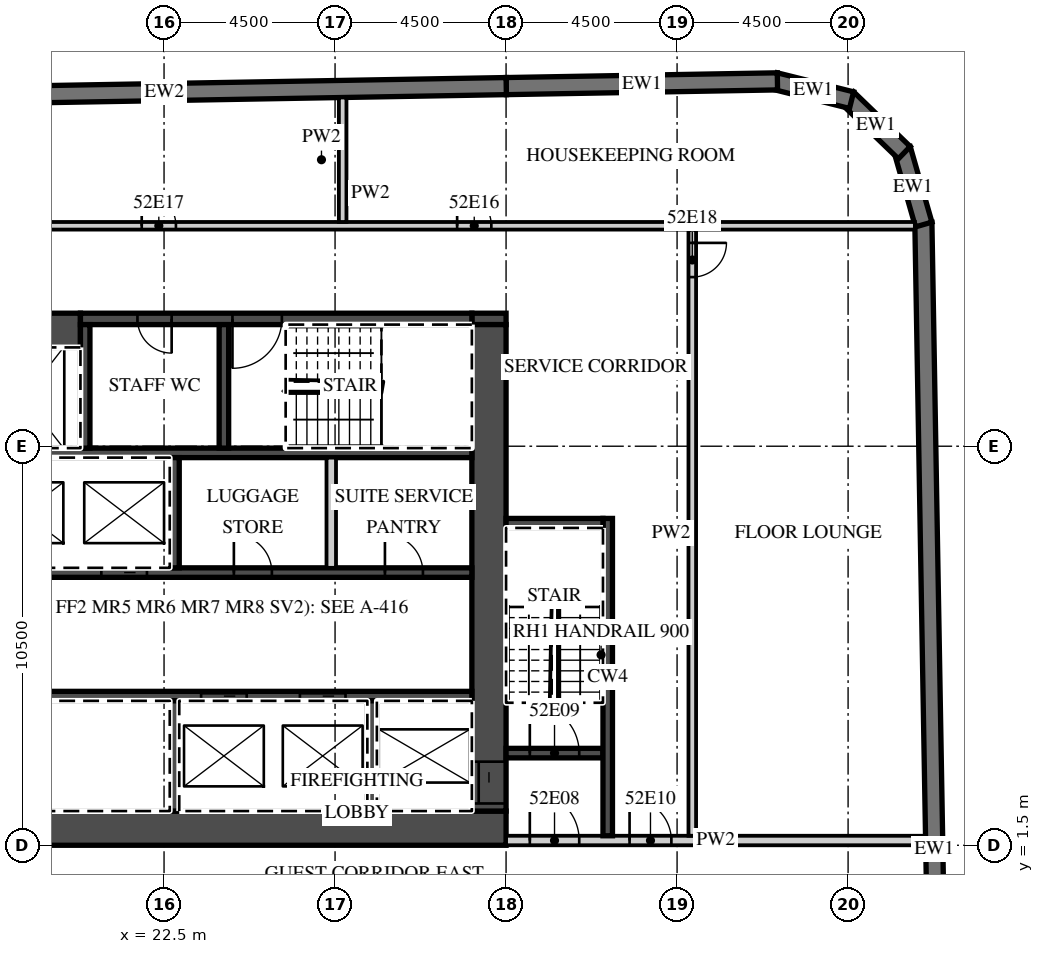
"""IFC4 building model, lengths in metres.
Left out: names, types, materials, properties, quantities, classifications, styles, units other than length and angle.
Written with IfcOpenShell. Run it as: python <this file> out.ifc"""

import sys

from ifc_helpers import new_model, si_unit, direction, frame, frame_2d, origin, place, context, subcontext, project, spatial, polyline, rectangle, outline, extrude, element, fill, save


model = new_model("IFC4")
c1 = context("Model", 3, precision=1e-05, world=origin(), true_north=direction((0.0, 1.0)))
c2 = subcontext(c1, "Body", "Model", "MODEL_VIEW")
j1 = project(units=[si_unit("LENGTHUNIT", "METRE"), si_unit("PLANEANGLEUNIT", "RADIAN")], contexts=[c1])
p1 = place(None, origin())
s1 = spatial("IfcSite", under=j1, at=p1, CompositionType="ELEMENT")
p2 = place(p1, origin())
s2 = spatial("IfcBuilding", under=s1, at=p2, CompositionType="ELEMENT")
p3 = place(p2, frame((0.0, 0.0, 217.7)))
s3 = spatial("IfcBuildingStorey", under=s2, at=p3, CompositionType="ELEMENT", Elevation=217.7)
p4 = place(p3, frame((43.057, -15.103, 0.0), z_axis=(0.0, 0.0, 1.0), x_axis=(-0.017452408953, 0.999847695112, 0.0)))
e1 = element("IfcWall", 1, at=p4, inside=s3, PredefinedType="SOLIDWALL", context=c2, shape_type="SweptSolid", body=[
    extrude(rectangle(XDim=33.0, YDim=0.45, at=frame_2d((16.5, 0.0))), origin(), (0.0, 0.0, 1.0), 3.02),
])
p5 = place(p3, frame((42.49, 17.833, 0.0), z_axis=(0.0, 0.0, 1.0), x_axis=(-0.275546368831, 0.961287781377, 0.0)))
e2 = element("IfcWall", 2, at=p5, inside=s3, PredefinedType="SOLIDWALL", context=c2, shape_type="SweptSolid", body=[
    extrude(outline(polyline([(0.0, -0.225), (2.071, -0.225), (1.95, 0.225), (0.121, 0.225), (0.0, -0.225)])), origin(), (0.0, 0.0, 1.0), 3.02),
])
p6 = place(p3, frame((41.979, 19.724, 0.0), z_axis=(0.0, 0.0, 1.0), x_axis=(-0.719379111448, 0.694617660308, 0.0)))
e3 = element("IfcWall", 3, at=p6, inside=s3, PredefinedType="SOLIDWALL", context=c2, shape_type="SweptSolid", body=[
    extrude(outline(polyline([(0.0, -0.225), (2.071, -0.225), (1.95, 0.225), (0.121, 0.225), (0.0, -0.225)])), origin(), (0.0, 0.0, 1.0), 3.02),
])
p7 = place(p3, frame((40.591, 21.106, 0.0), z_axis=(0.0, 0.0, 1.0), x_axis=(-0.970287979719, 0.241952963225, 0.0)))
e4 = element("IfcWall", 4, at=p7, inside=s3, PredefinedType="SOLIDWALL", context=c2, shape_type="SweptSolid", body=[
    extrude(outline(polyline([(0.0, -0.225), (2.071, -0.225), (1.95, 0.225), (0.121, 0.225), (0.0, -0.225)])), origin(), (0.0, 0.0, 1.0), 3.02),
])
p8 = place(p3, frame((38.641, 21.6, 0.0), z_axis=(0.0, 0.0, 1.0), x_axis=(-0.999847245074, -0.017478172627, 0.0)))
e5 = element("IfcWall", 5, at=p8, inside=s3, PredefinedType="SOLIDWALL", context=c2, shape_type="SweptSolid", body=[
    extrude(rectangle(XDim=7.138, YDim=0.45, at=frame_2d((3.569, 0.0))), origin(), (0.0, 0.0, 1.0), 3.02),
])
p9 = place(p3, frame((31.504, 21.476, 0.0), z_axis=(0.0, 0.0, 1.0), x_axis=(-0.999847677887, -0.017453395744, 0.0)))
e6 = element("IfcWall", 6, at=p9, inside=s3, PredefinedType="SOLIDWALL", context=c2, shape_type="SweptSolid", body=[
    extrude(rectangle(XDim=18.003, YDim=0.45, at=frame_2d((9.001, 0.0))), origin(), (0.0, 0.0, 1.0), 3.02),
])
p10 = place(p3, frame((13.5, 1.95, 0.0), z_axis=(0.0, 0.0, 1.0), x_axis=(1.0, 0.0, 0.0)))
e7 = element("IfcWall", 7, at=p10, inside=s3, PredefinedType="SHEAR", context=c2, shape_type="SweptSolid", body=[
    extrude(rectangle(XDim=18.0, YDim=0.9, at=frame_2d((9.0, 0.0))), origin(), (0.0, 0.0, 1.0), 3.02),
])
p11 = place(p10, frame((1.475, 0.0, 0.0)))
e8 = element("IfcOpeningElement", 8, at=p11, cuts=e7, PredefinedType="OPENING", context=c2, shape_type="SweptSolid", body=[
    extrude(rectangle(XDim=1.8, YDim=2.1, at=frame_2d((0.9, 1.05))), frame((0.0, 0.46, 0.0), z_axis=(0.0, -1.0, 0.0), x_axis=(1.0, 0.0, 0.0)), (0.0, 0.0, 1.0), 0.92),
])
p12 = place(p3, frame((13.5, 15.05, 0.0), z_axis=(0.0, 0.0, 1.0), x_axis=(1.0, 0.0, 0.0)))
e9 = element("IfcWall", 9, at=p12, inside=s3, PredefinedType="SHEAR", context=c2, shape_type="SweptSolid", body=[
    extrude(rectangle(XDim=6.8, YDim=0.9, at=frame_2d((3.4, 0.0))), origin(), (0.0, 0.0, 1.0), 3.02),
])
p13 = place(p12, frame((4.725, 0.0, 0.0)))
e10 = element("IfcOpeningElement", 10, at=p13, cuts=e9, PredefinedType="OPENING", context=c2, shape_type="SweptSolid", body=[
    extrude(rectangle(XDim=1.2, YDim=2.1, at=frame_2d((0.6, 1.05))), frame((0.0, 0.46, 0.0), z_axis=(0.0, -1.0, 0.0), x_axis=(1.0, 0.0, 0.0)), (0.0, 0.0, 1.0), 0.92),
])
p14 = place(p3, frame((30.6, 15.35, 0.0), z_axis=(0.0, 0.0, 1.0), x_axis=(1.0, 0.0, 0.0)))
e11 = element("IfcWall", 11, at=p14, inside=s3, PredefinedType="SHEAR", context=c2, shape_type="SweptSolid", body=[
    extrude(rectangle(XDim=0.9, YDim=0.3, at=frame_2d((0.45, 0.0))), origin(), (0.0, 0.0, 1.0), 3.02),
])
p15 = place(p3, frame((20.3, 15.35, 0.0), z_axis=(0.0, 0.0, 1.0), x_axis=(1.0, 0.0, 0.0)))
e12 = element("IfcWall", 12, at=p15, inside=s3, PredefinedType="SHEAR", context=c2, shape_type="SweptSolid", body=[
    extrude(rectangle(XDim=10.3, YDim=0.3, at=frame_2d((5.15, 0.0))), origin(), (0.0, 0.0, 1.0), 3.02),
])
p16 = place(p15, frame((4.0, 0.0, 0.0)))
e13 = element("IfcOpeningElement", 13, at=p16, cuts=e12, PredefinedType="OPENING", context=c2, shape_type="SweptSolid", body=[
    extrude(rectangle(XDim=1.3, YDim=2.1, at=frame_2d((0.65, 1.05))), frame((0.0, 0.16, 0.0), z_axis=(0.0, -1.0, 0.0), x_axis=(1.0, 0.0, 0.0)), (0.0, 0.0, 1.0), 0.32),
])
p17 = place(p15, frame((1.5, 0.0, 0.0)))
e14 = element("IfcOpeningElement", 14, at=p17, cuts=e12, PredefinedType="OPENING", context=c2, shape_type="SweptSolid", body=[
    extrude(rectangle(XDim=0.9, YDim=2.1, at=frame_2d((0.45, 1.05))), frame((0.0, 0.16, 0.0), z_axis=(0.0, -1.0, 0.0), x_axis=(1.0, 0.0, 0.0)), (0.0, 0.0, 1.0), 0.32),
])
p18 = place(p3, frame((31.05, 2.4, 0.0), z_axis=(0.0, 0.0, 1.0), x_axis=(0.0, 1.0, 0.0)))
e15 = element("IfcWall", 15, at=p18, inside=s3, PredefinedType="SHEAR", context=c2, shape_type="SweptSolid", body=[
    extrude(rectangle(XDim=12.8, YDim=0.9, at=frame_2d((6.4, 0.0))), origin(), (0.0, 0.0, 1.0), 3.02),
])
p19 = place(p18, frame((0.2, 0.0, 0.0)))
e16 = element("IfcOpeningElement", 16, at=p19, cuts=e15, PredefinedType="OPENING", context=c2, shape_type="SweptSolid", body=[
    extrude(rectangle(XDim=1.1, YDim=2.1, at=frame_2d((0.55, 1.05))), frame((0.0, 0.46, 0.0), z_axis=(0.0, -1.0, 0.0), x_axis=(1.0, 0.0, 0.0)), (0.0, 0.0, 1.0), 0.92),
])
p20 = place(p3, frame((17.6, 5.425, 0.0), z_axis=(0.0, 0.0, 1.0), x_axis=(1.0, 0.0, 0.0)))
e17 = element("IfcWall", 17, at=p20, inside=s3, PredefinedType="SHEAR", context=c2, shape_type="SweptSolid", body=[
    extrude(rectangle(XDim=13.0, YDim=0.25, at=frame_2d((6.5, 0.0))), origin(), (0.0, 0.0, 1.0), 3.02),
])
p21 = place(p20, frame((8.475, 0.0, 0.0)))
e18 = element("IfcOpeningElement", 18, at=p21, cuts=e17, PredefinedType="OPENING", context=c2, shape_type="SweptSolid", body=[
    extrude(rectangle(XDim=1.2, YDim=2.1, at=frame_2d((0.6, 1.05))), frame((0.0, 0.135, 0.0), z_axis=(0.0, -1.0, 0.0), x_axis=(1.0, 0.0, 0.0)), (0.0, 0.0, 1.0), 0.27),
])
p22 = place(p20, frame((5.875, 0.0, 0.0)))
e19 = element("IfcOpeningElement", 19, at=p22, cuts=e17, PredefinedType="OPENING", context=c2, shape_type="SweptSolid", body=[
    extrude(rectangle(XDim=1.2, YDim=2.1, at=frame_2d((0.6, 1.05))), frame((0.0, 0.135, 0.0), z_axis=(0.0, -1.0, 0.0), x_axis=(1.0, 0.0, 0.0)), (0.0, 0.0, 1.0), 0.27),
])
for number, where, z_axis, x_axis in (
    (20, (27.975, 2.4, 0.0), (0.0, 0.0, 1.0), (0.0, 1.0, 0.0)),
    (21, (22.775, 2.4, 0.0), (0.0, 0.0, 1.0), (0.0, 1.0, 0.0)),
):
    element("IfcWall", number, at=place(p3, frame(where, z_axis=z_axis, x_axis=x_axis)), inside=s3, PredefinedType="SHEAR", context=c2, shape_type="SweptSolid", body=[
        extrude(rectangle(XDim=2.9, YDim=0.25, at=frame_2d((1.45, 0.0))), origin(), (0.0, 0.0, 1.0), 3.02),
    ])
p23 = place(p3, frame((14.4, 8.675, 0.0), z_axis=(0.0, 0.0, 1.0), x_axis=(1.0, 0.0, 0.0)))
e22 = element("IfcWall", 22, at=p23, inside=s3, PredefinedType="SHEAR", context=c2, shape_type="SweptSolid", body=[
    extrude(rectangle(XDim=16.2, YDim=0.25, at=frame_2d((8.1, 0.0))), origin(), (0.0, 0.0, 1.0), 3.02),
])
p24 = place(p23, frame((6.45, 0.0, 0.0)))
e23 = element("IfcOpeningElement", 23, at=p24, cuts=e22, PredefinedType="OPENING", context=c2, shape_type="SweptSolid", body=[
    extrude(rectangle(XDim=1.2, YDim=2.1, at=frame_2d((0.6, 1.05))), frame((0.0, 0.135, 0.0), z_axis=(0.0, -1.0, 0.0), x_axis=(1.0, 0.0, 0.0)), (0.0, 0.0, 1.0), 0.27),
])
p25 = place(p23, frame((3.8, 0.0, 0.0)))
e24 = element("IfcOpeningElement", 24, at=p25, cuts=e22, PredefinedType="OPENING", context=c2, shape_type="SweptSolid", body=[
    extrude(rectangle(XDim=1.2, YDim=2.1, at=frame_2d((0.6, 1.05))), frame((0.0, 0.135, 0.0), z_axis=(0.0, -1.0, 0.0), x_axis=(1.0, 0.0, 0.0)), (0.0, 0.0, 1.0), 0.27),
])
p26 = place(p23, frame((0.65, 0.0, 0.0)))
e25 = element("IfcOpeningElement", 25, at=p26, cuts=e22, PredefinedType="OPENING", context=c2, shape_type="SweptSolid", body=[
    extrude(rectangle(XDim=1.3, YDim=2.1, at=frame_2d((0.65, 1.05))), frame((0.0, 0.135, 0.0), z_axis=(0.0, -1.0, 0.0), x_axis=(1.0, 0.0, 0.0)), (0.0, 0.0, 1.0), 0.27),
])
p27 = place(p23, frame((13.913, 0.0, 0.0)))
e26 = element("IfcOpeningElement", 26, at=p27, cuts=e22, PredefinedType="OPENING", context=c2, shape_type="SweptSolid", body=[
    extrude(rectangle(XDim=1.0, YDim=2.1, at=frame_2d((0.5, 1.05))), frame((0.0, 0.135, 0.0), z_axis=(0.0, -1.0, 0.0), x_axis=(1.0, 0.0, 0.0)), (0.0, 0.0, 1.0), 0.27),
])
p28 = place(p23, frame((9.938, 0.0, 0.0)))
e27 = element("IfcOpeningElement", 27, at=p28, cuts=e22, PredefinedType="OPENING", context=c2, shape_type="SweptSolid", body=[
    extrude(rectangle(XDim=1.0, YDim=2.1, at=frame_2d((0.5, 1.05))), frame((0.0, 0.135, 0.0), z_axis=(0.0, -1.0, 0.0), x_axis=(1.0, 0.0, 0.0)), (0.0, 0.0, 1.0), 0.27),
])
p29 = place(p3, frame((17.35, 11.825, 0.0), z_axis=(0.0, 0.0, 1.0), x_axis=(1.0, 0.0, 0.0)))
e28 = element("IfcWall", 28, at=p29, inside=s3, PredefinedType="SHEAR", context=c2, shape_type="SweptSolid", body=[
    extrude(rectangle(XDim=13.25, YDim=0.25, at=frame_2d((6.625, 0.0))), origin(), (0.0, 0.0, 1.0), 3.02),
])
p30 = place(p3, frame((22.775, 8.8, 0.0), z_axis=(0.0, 0.0, 1.0), x_axis=(0.0, 1.0, 0.0)))
e29 = element("IfcWall", 29, at=p30, inside=s3, PredefinedType="SHEAR", context=c2, shape_type="SweptSolid", body=[
    extrude(rectangle(XDim=2.9, YDim=0.25, at=frame_2d((1.45, 0.0))), origin(), (0.0, 0.0, 1.0), 3.02),
])
p31 = place(p3, frame((26.9, 8.8, 0.0), z_axis=(0.0, 0.0, 1.0), x_axis=(0.0, 1.0, 0.0)))
e30 = element("IfcWall", 30, at=p31, inside=s3, PredefinedType="PARTITIONING", context=c2, shape_type="SweptSolid", body=[
    extrude(rectangle(XDim=2.9, YDim=0.25, at=frame_2d((1.45, 0.0))), origin(), (0.0, 0.0, 1.0), 3.02),
])
for number, where, z_axis, x_axis in (
    (31, (20.425, 11.95, 0.0), (0.0, 0.0, 1.0), (0.0, 1.0, 0.0)),
    (32, (24.075, 11.95, 0.0), (0.0, 0.0, 1.0), (0.0, 1.0, 0.0)),
):
    element("IfcWall", number, at=place(p3, frame(where, z_axis=z_axis, x_axis=x_axis)), inside=s3, PredefinedType="SHEAR", context=c2, shape_type="SweptSolid", body=[
        extrude(rectangle(XDim=3.25, YDim=0.25, at=frame_2d((1.625, 0.0))), origin(), (0.0, 0.0, 1.0), 3.02),
    ])
p32 = place(p3, frame((31.5, 1.625, 0.0), z_axis=(0.0, 0.0, 1.0), x_axis=(1.0, 0.0, 0.0)))
e33 = element("IfcWall", 33, at=p32, inside=s3, PredefinedType="PARTITIONING", context=c2, shape_type="SweptSolid", body=[
    extrude(rectangle(XDim=11.04, YDim=0.25, at=frame_2d((5.52, 0.0))), origin(), (0.0, 0.0, 1.0), 3.02),
])
p33 = place(p32, frame((0.625, 0.0, 0.0)))
e34 = element("IfcOpeningElement", 34, at=p33, cuts=e33, PredefinedType="OPENING", context=c2, shape_type="SweptSolid", body=[
    extrude(rectangle(XDim=1.3, YDim=2.1, at=frame_2d((0.65, 1.05))), frame((0.0, 0.135, 0.0), z_axis=(0.0, -1.0, 0.0), x_axis=(1.0, 0.0, 0.0)), (0.0, 0.0, 1.0), 0.27),
])
p34 = place(p32, frame((3.25, 0.0, 0.0)))
e35 = element("IfcOpeningElement", 35, at=p34, cuts=e33, PredefinedType="OPENING", context=c2, shape_type="SweptSolid", body=[
    extrude(rectangle(XDim=1.1, YDim=2.1, at=frame_2d((0.55, 1.05))), frame((0.0, 0.135, 0.0), z_axis=(0.0, -1.0, 0.0), x_axis=(1.0, 0.0, 0.0)), (0.0, 0.0, 1.0), 0.27),
])
p35 = place(p3, frame((31.5, 3.925, 0.0), z_axis=(0.0, 0.0, 1.0), x_axis=(1.0, 0.0, 0.0)))
e36 = element("IfcWall", 36, at=p35, inside=s3, PredefinedType="SHEAR", context=c2, shape_type="SweptSolid", body=[
    extrude(rectangle(XDim=2.55, YDim=0.25, at=frame_2d((1.275, 0.0))), origin(), (0.0, 0.0, 1.0), 3.02),
])
p36 = place(p35, frame((0.625, 0.0, 0.0)))
e37 = element("IfcOpeningElement", 37, at=p36, cuts=e36, PredefinedType="OPENING", context=c2, shape_type="SweptSolid", body=[
    extrude(rectangle(XDim=1.3, YDim=2.1, at=frame_2d((0.65, 1.05))), frame((0.0, 0.135, 0.0), z_axis=(0.0, -1.0, 0.0), x_axis=(1.0, 0.0, 0.0)), (0.0, 0.0, 1.0), 0.27),
])
p37 = place(p3, frame((34.175, 1.75, 0.0), z_axis=(0.0, 0.0, 1.0), x_axis=(0.0, 1.0, 0.0)))
e38 = element("IfcWall", 38, at=p37, inside=s3, PredefinedType="SHEAR", context=c2, shape_type="SweptSolid", body=[
    extrude(rectangle(XDim=8.35, YDim=0.25, at=frame_2d((4.175, 0.0))), origin(), (0.0, 0.0, 1.0), 3.02),
])
p38 = place(p3, frame((31.5, 9.975, 0.0), z_axis=(0.0, 0.0, 1.0), x_axis=(1.0, 0.0, 0.0)))
e39 = element("IfcWall", 39, at=p38, inside=s3, PredefinedType="SHEAR", context=c2, shape_type="SweptSolid", body=[
    extrude(rectangle(XDim=2.55, YDim=0.25, at=frame_2d((1.275, 0.0))), origin(), (0.0, 0.0, 1.0), 3.02),
])
p39 = place(p3, frame((36.4, 1.75, 0.0), z_axis=(0.0, 0.0, 1.0), x_axis=(0.0, 1.0, 0.0)))
e40 = element("IfcWall", 40, at=p39, inside=s3, PredefinedType="PARTITIONING", context=c2, shape_type="SweptSolid", body=[
    extrude(rectangle(XDim=15.95, YDim=0.2, at=frame_2d((7.975, 0.0))), origin(), (0.0, 0.0, 1.0), 3.02),
])
p40 = place(p39, frame((14.7, 0.0, 0.0)))
e41 = element("IfcOpeningElement", 41, at=p40, cuts=e40, PredefinedType="OPENING", context=c2, shape_type="SweptSolid", body=[
    extrude(rectangle(XDim=0.9, YDim=2.1, at=frame_2d((0.45, 1.05))), frame((0.0, 0.11, 0.0), z_axis=(0.0, -1.0, 0.0), x_axis=(1.0, 0.0, 0.0)), (0.0, 0.0, 1.0), 0.22),
])
p41 = place(p3, frame((13.6, 17.8, 0.0), z_axis=(0.0, 0.0, 1.0), x_axis=(1.0, 0.0, 0.0)))
e42 = element("IfcWall", 42, at=p41, inside=s3, PredefinedType="PARTITIONING", context=c2, shape_type="SweptSolid", body=[
    extrude(rectangle(XDim=28.657, YDim=0.2, at=frame_2d((14.329, 0.0))), origin(), (0.0, 0.0, 1.0), 3.02),
])
p42 = place(p41, frame((16.613, 0.0, 0.0)))
e43 = element("IfcOpeningElement", 43, at=p42, cuts=e42, PredefinedType="OPENING", context=c2, shape_type="SweptSolid", body=[
    extrude(rectangle(XDim=0.9, YDim=2.1, at=frame_2d((0.45, 1.05))), frame((0.0, 0.11, 0.0), z_axis=(0.0, -1.0, 0.0), x_axis=(1.0, 0.0, 0.0)), (0.0, 0.0, 1.0), 0.22),
])
p43 = place(p41, frame((8.312, 0.0, 0.0)))
e44 = element("IfcOpeningElement", 44, at=p43, cuts=e42, PredefinedType="OPENING", context=c2, shape_type="SweptSolid", body=[
    extrude(rectangle(XDim=0.9, YDim=2.1, at=frame_2d((0.45, 1.05))), frame((0.0, 0.11, 0.0), z_axis=(0.0, -1.0, 0.0), x_axis=(1.0, 0.0, 0.0)), (0.0, 0.0, 1.0), 0.22),
])
p44 = place(p3, frame((27.2, 17.9, 0.0), z_axis=(0.0, 0.0, 1.0), x_axis=(0.0, 1.0, 0.0)))
e45 = element("IfcWall", 45, at=p44, inside=s3, PredefinedType="PARTITIONING", context=c2, shape_type="SweptSolid", body=[
    extrude(rectangle(XDim=3.276, YDim=0.2, at=frame_2d((1.638, 0.0))), origin(), (0.0, 0.0, 1.0), 3.02),
])
p45 = place(p24, origin())
e46 = element("IfcDoor", 46, at=p45, inside=s3, OperationType="SLIDING_TO_LEFT", PredefinedType="DOOR", context=c2, shape_type="SweptSolid", body=[
    extrude(rectangle(XDim=1.2, YDim=2.1, at=frame_2d((0.6, 1.05))), frame((0.0, 0.025, 0.0), z_axis=(0.0, -1.0, 0.0), x_axis=(1.0, 0.0, 0.0)), (0.0, 0.0, 1.0), 0.05),
])
fill(e23, e46)
p46 = place(p21, origin())
e47 = element("IfcDoor", 47, at=p46, inside=s3, OperationType="SLIDING_TO_LEFT", PredefinedType="DOOR", context=c2, shape_type="SweptSolid", body=[
    extrude(rectangle(XDim=1.2, YDim=2.1, at=frame_2d((0.6, 1.05))), frame((0.0, 0.025, 0.0), z_axis=(0.0, -1.0, 0.0), x_axis=(1.0, 0.0, 0.0)), (0.0, 0.0, 1.0), 0.05),
])
fill(e18, e47)
p47 = place(p22, origin())
e48 = element("IfcDoor", 48, at=p47, inside=s3, OperationType="SLIDING_TO_RIGHT", PredefinedType="DOOR", context=c2, shape_type="SweptSolid", body=[
    extrude(rectangle(XDim=1.2, YDim=2.1, at=frame_2d((0.6, 1.05))), frame((0.0, 0.025, 0.0), z_axis=(0.0, -1.0, 0.0), x_axis=(1.0, 0.0, 0.0)), (0.0, 0.0, 1.0), 0.05),
])
fill(e19, e48)
p48 = place(p19, origin())
e49 = element("IfcDoor", 49, at=p48, inside=s3, OperationType="SLIDING_TO_LEFT", PredefinedType="DOOR", context=c2, shape_type="SweptSolid", body=[
    extrude(rectangle(XDim=1.1, YDim=2.1, at=frame_2d((0.55, 1.05))), frame((0.0, 0.025, 0.0), z_axis=(0.0, -1.0, 0.0), x_axis=(1.0, 0.0, 0.0)), (0.0, 0.0, 1.0), 0.05),
])
fill(e16, e49)
p49 = place(p33, origin())
e50 = element("IfcDoor", 50, at=p49, inside=s3, OperationType="SINGLE_SWING_LEFT", PredefinedType="DOOR", context=c2, shape_type="SweptSolid", body=[
    extrude(rectangle(XDim=1.3, YDim=2.1, at=frame_2d((0.65, 1.05))), frame((0.0, 0.025, 0.0), z_axis=(0.0, -1.0, 0.0), x_axis=(1.0, 0.0, 0.0)), (0.0, 0.0, 1.0), 0.05),
])
fill(e34, e50)
p50 = place(p36, origin())
e51 = element("IfcDoor", 51, at=p50, inside=s3, OperationType="SINGLE_SWING_LEFT", PredefinedType="DOOR", context=c2, shape_type="SweptSolid", body=[
    extrude(rectangle(XDim=1.3, YDim=2.1, at=frame_2d((0.65, 1.05))), frame((0.0, 0.025, 0.0), z_axis=(0.0, -1.0, 0.0), x_axis=(1.0, 0.0, 0.0)), (0.0, 0.0, 1.0), 0.05),
])
fill(e37, e51)
p51 = place(p34, origin())
e52 = element("IfcDoor", 52, at=p51, inside=s3, OperationType="SINGLE_SWING_LEFT", PredefinedType="DOOR", context=c2, shape_type="SweptSolid", body=[
    extrude(rectangle(XDim=1.1, YDim=2.1, at=frame_2d((0.55, 1.05))), frame((0.0, 0.025, 0.0), z_axis=(0.0, -1.0, 0.0), x_axis=(1.0, 0.0, 0.0)), (0.0, 0.0, 1.0), 0.05),
])
fill(e35, e52)
p52 = place(p16, origin())
e53 = element("IfcDoor", 53, at=p52, inside=s3, OperationType="SINGLE_SWING_LEFT", PredefinedType="DOOR", context=c2, shape_type="SweptSolid", body=[
    extrude(rectangle(XDim=1.3, YDim=2.1, at=frame_2d((0.65, 1.05))), frame((0.0, 0.025, 0.0), z_axis=(0.0, -1.0, 0.0), x_axis=(1.0, 0.0, 0.0)), (0.0, 0.0, 1.0), 0.05),
])
fill(e13, e53)
p53 = place(p17, origin())
e54 = element("IfcDoor", 54, at=p53, inside=s3, OperationType="SINGLE_SWING_RIGHT", PredefinedType="DOOR", context=c2, shape_type="SweptSolid", body=[
    extrude(rectangle(XDim=0.9, YDim=2.1, at=frame_2d((0.45, 1.05))), frame((0.0, 0.025, 0.0), z_axis=(0.0, -1.0, 0.0), x_axis=(1.0, 0.0, 0.0)), (0.0, 0.0, 1.0), 0.05),
])
fill(e14, e54)
p54 = place(p27, origin())
e55 = element("IfcDoor", 55, at=p54, inside=s3, OperationType="SINGLE_SWING_LEFT", PredefinedType="DOOR", context=c2, shape_type="SweptSolid", body=[
    extrude(rectangle(XDim=1.0, YDim=2.1, at=frame_2d((0.5, 1.05))), frame((0.0, 0.025, 0.0), z_axis=(0.0, -1.0, 0.0), x_axis=(1.0, 0.0, 0.0)), (0.0, 0.0, 1.0), 0.05),
])
fill(e26, e55)
p55 = place(p28, origin())
e56 = element("IfcDoor", 56, at=p55, inside=s3, OperationType="SINGLE_SWING_LEFT", PredefinedType="DOOR", context=c2, shape_type="SweptSolid", body=[
    extrude(rectangle(XDim=1.0, YDim=2.1, at=frame_2d((0.5, 1.05))), frame((0.0, 0.025, 0.0), z_axis=(0.0, -1.0, 0.0), x_axis=(1.0, 0.0, 0.0)), (0.0, 0.0, 1.0), 0.05),
])
fill(e27, e56)
p56 = place(p42, origin())
e57 = element("IfcDoor", 57, at=p56, inside=s3, OperationType="SINGLE_SWING_LEFT", PredefinedType="DOOR", context=c2, shape_type="SweptSolid", body=[
    extrude(rectangle(XDim=0.9, YDim=2.1, at=frame_2d((0.45, 1.05))), frame((0.0, 0.025, 0.0), z_axis=(0.0, -1.0, 0.0), x_axis=(1.0, 0.0, 0.0)), (0.0, 0.0, 1.0), 0.05),
])
fill(e43, e57)
p57 = place(p43, origin())
e58 = element("IfcDoor", 58, at=p57, inside=s3, OperationType="SINGLE_SWING_LEFT", PredefinedType="DOOR", context=c2, shape_type="SweptSolid", body=[
    extrude(rectangle(XDim=0.9, YDim=2.1, at=frame_2d((0.45, 1.05))), frame((0.0, 0.025, 0.0), z_axis=(0.0, -1.0, 0.0), x_axis=(1.0, 0.0, 0.0)), (0.0, 0.0, 1.0), 0.05),
])
fill(e44, e58)
p58 = place(p40, origin())
e59 = element("IfcDoor", 59, at=p58, inside=s3, OperationType="SINGLE_SWING_RIGHT", PredefinedType="DOOR", context=c2, shape_type="SweptSolid", body=[
    extrude(rectangle(XDim=0.9, YDim=2.1, at=frame_2d((0.45, 1.05))), frame((0.0, 0.025, 0.0), z_axis=(0.0, -1.0, 0.0), x_axis=(1.0, 0.0, 0.0)), (0.0, 0.0, 1.0), 0.05),
])
fill(e41, e59)
save(model, sys.argv[1])
